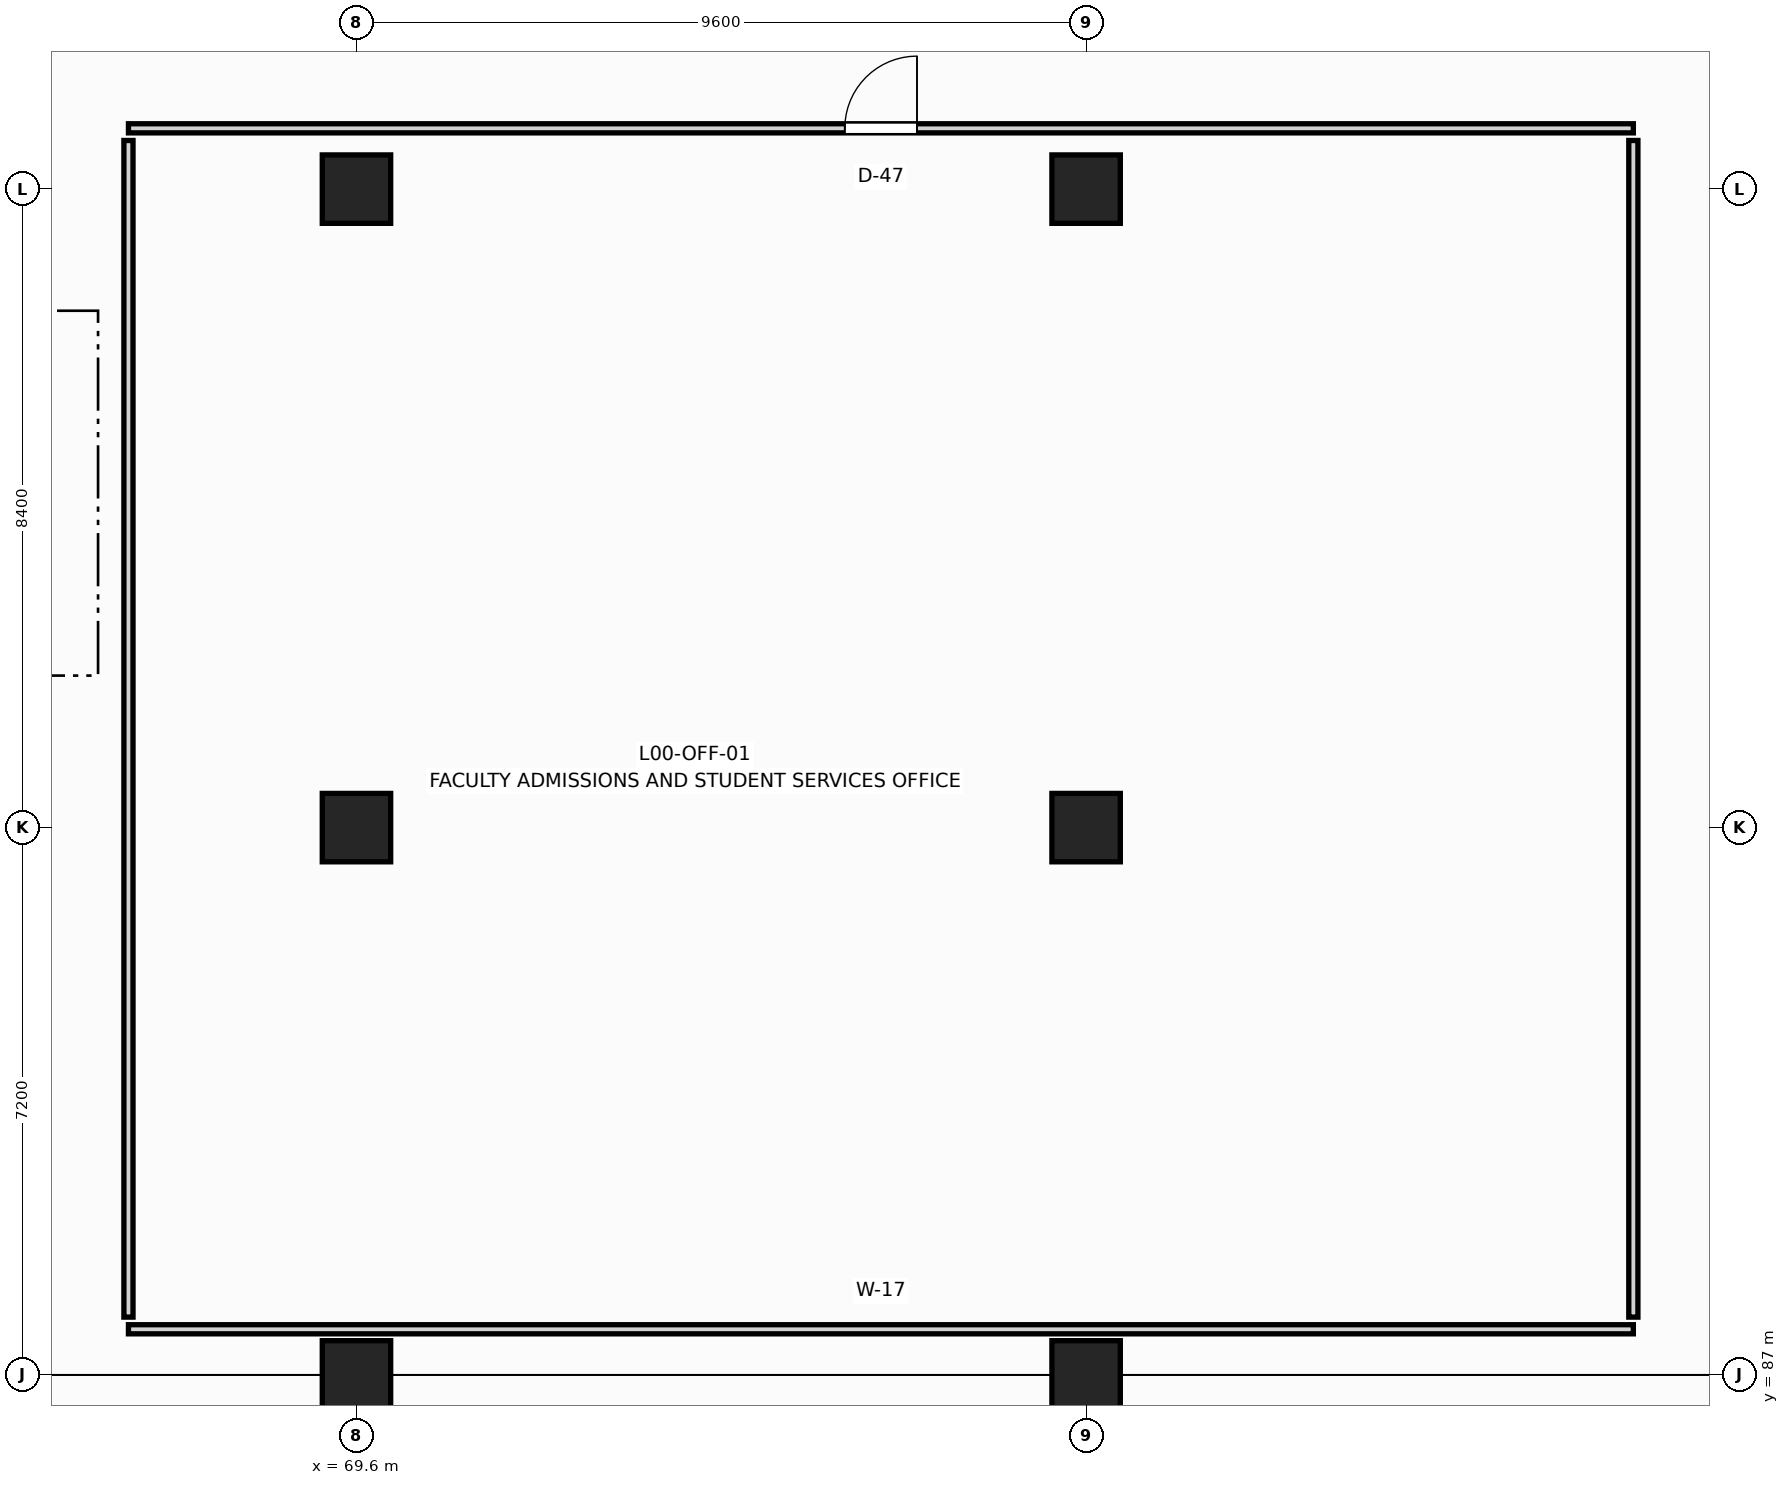
"""IFC4 building model, lengths in metres.
Left out: names, types, materials, properties, quantities, classifications, styles, units other than length and angle.
Written with IfcOpenShell. Run it as: python <this file> out.ifc"""

import sys

from ifc_helpers import new_model, si_unit, direction, frame, frame_2d, origin, origin_2d, place, context, subcontext, project, spatial, rectangle, extrude, element, fill, save


model = new_model("IFC4")
c1 = context("Model", 3, precision=1e-05, world=origin(), true_north=direction((0.0, 1.0)))
c2 = subcontext(c1, "Body", "Model", "MODEL_VIEW")
j1 = project(units=[si_unit("LENGTHUNIT", "METRE"), si_unit("PLANEANGLEUNIT", "RADIAN")], contexts=[c1])
p1 = place(None, origin())
s1 = spatial("IfcSite", under=j1, at=p1, CompositionType="ELEMENT")
p2 = place(p1, origin())
s2 = spatial("IfcBuilding", under=s1, at=p2, CompositionType="ELEMENT")
p3 = place(p2, origin())
s3 = spatial("IfcBuildingStorey", under=s2, at=p3, CompositionType="ELEMENT", Elevation=0.0)
for number, where, z_axis, x_axis in (
    (1, (69.6, 87.0, 0.0), (0.0, 0.0, 1.0), (1.0, 0.0, 0.0)),
    (2, (69.6, 94.2, 0.0), (0.0, 0.0, 1.0), (1.0, 0.0, 0.0)),
    (3, (69.6, 102.6, 0.0), (0.0, 0.0, 1.0), (1.0, 0.0, 0.0)),
    (4, (79.2, 87.0, 0.0), (0.0, 0.0, 1.0), (1.0, 0.0, 0.0)),
    (5, (79.2, 94.2, 0.0), (0.0, 0.0, 1.0), (1.0, 0.0, 0.0)),
    (6, (79.2, 102.6, 0.0), (0.0, 0.0, 1.0), (1.0, 0.0, 0.0)),
):
    element("IfcColumn", number, at=place(p3, frame(where, z_axis=z_axis, x_axis=x_axis)), inside=s3, PredefinedType="COLUMN", context=c2, shape_type="SweptSolid", body=[
        extrude(rectangle(XDim=0.9, YDim=0.9, at=origin_2d()), origin(), (0.0, 0.0, 1.0), 5.08),
    ])
p4 = place(p3, frame((66.6, 87.6, 0.0), z_axis=(0.0, 0.0, 1.0), x_axis=(1.0, 0.0, 0.0)))
e7 = element("IfcWall", 7, at=p4, inside=s3, PredefinedType="PARTITIONING", context=c2, shape_type="SweptSolid", body=[
    extrude(rectangle(XDim=19.8, YDim=0.12, at=frame_2d((9.9, 0.0))), origin(), (0.0, 0.0, 1.0), 4.12),
])
p5 = place(p3, frame((66.6, 103.4, 0.0), z_axis=(0.0, 0.0, 1.0), x_axis=(1.0, 0.0, 0.0)))
e8 = element("IfcWall", 8, at=p5, inside=s3, PredefinedType="PARTITIONING", context=c2, shape_type="SweptSolid", body=[
    extrude(rectangle(XDim=19.8, YDim=0.12, at=frame_2d((9.9, 0.0))), origin(), (0.0, 0.0, 1.0), 4.12),
])
p6 = place(p5, frame((9.425, 0.0, 0.0)))
e9 = element("IfcOpeningElement", 9, at=p6, cuts=e8, PredefinedType="OPENING", context=c2, shape_type="SweptSolid", body=[
    extrude(rectangle(XDim=0.95, YDim=2.15, at=frame_2d((0.475, 1.075))), frame((0.0, 0.07, 0.0), z_axis=(0.0, -1.0, 0.0), x_axis=(1.0, 0.0, 0.0)), (0.0, 0.0, 1.0), 0.14),
])
for number, where, z_axis, x_axis in (
    (10, (66.6, 87.76, 0.0), (0.0, 0.0, 1.0), (0.0, 1.0, 0.0)),
    (11, (86.4, 87.76, 0.0), (0.0, 0.0, 1.0), (0.0, 1.0, 0.0)),
):
    element("IfcWall", number, at=place(p3, frame(where, z_axis=z_axis, x_axis=x_axis)), inside=s3, PredefinedType="PARTITIONING", context=c2, shape_type="SweptSolid", body=[
        extrude(rectangle(XDim=15.48, YDim=0.12, at=frame_2d((7.74, 0.0))), origin(), (0.0, 0.0, 1.0), 4.12),
    ])
p7 = place(p6, origin())
e12 = element("IfcDoor", 12, at=p7, inside=s3, OperationType="SINGLE_SWING_RIGHT", PredefinedType="DOOR", context=c2, shape_type="SweptSolid", body=[
    extrude(rectangle(XDim=0.95, YDim=2.15, at=frame_2d((0.475, 1.075))), frame((0.0, 0.025, 0.0), z_axis=(0.0, -1.0, 0.0), x_axis=(1.0, 0.0, 0.0)), (0.0, 0.0, 1.0), 0.05),
])
fill(e9, e12)
save(model, sys.argv[1])
